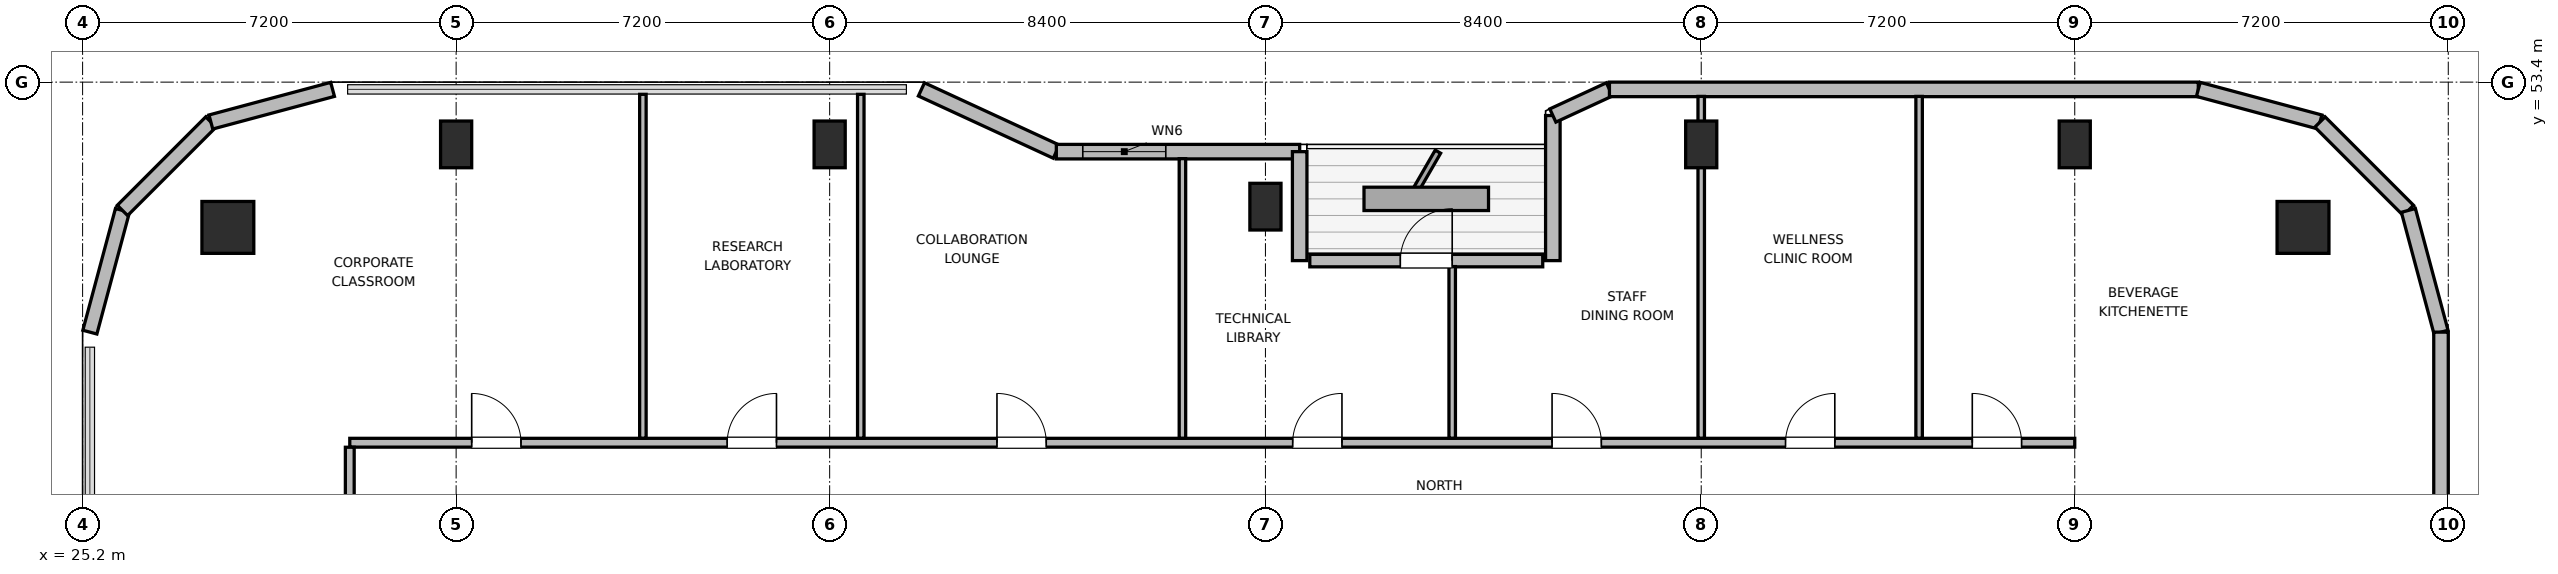
"""IFC4 building model, lengths in metres.
Left out: names, types, materials, properties, quantities, classifications, styles, units other than length and angle.
Written with IfcOpenShell. Run it as: python <this file> out.ifc"""

import sys

from ifc_helpers import new_model, si_unit, direction, frame, frame_2d, origin, origin_2d, place, context, subcontext, project, spatial, rectangle, circle, extrude, element, fill, save


model = new_model("IFC4")
c1 = context("Model", 3, precision=1e-05, world=origin(), true_north=direction((0.0, 1.0)))
c2 = subcontext(c1, "Body", "Model", "MODEL_VIEW")
j1 = project(units=[si_unit("LENGTHUNIT", "METRE"), si_unit("PLANEANGLEUNIT", "RADIAN")], contexts=[c1])
p1 = place(None, origin())
s1 = spatial("IfcSite", under=j1, at=p1, CompositionType="ELEMENT")
p2 = place(p1, origin())
s2 = spatial("IfcBuilding", under=s1, at=p2, CompositionType="ELEMENT")
p3 = place(p2, frame((0.0, 0.0, 270.6)))
s3 = spatial("IfcBuildingStorey", under=s2, at=p3, CompositionType="ELEMENT", Elevation=270.6)
for number, where, z_axis, x_axis in (
    (1, (68.0, 50.6, 0.0), (0.0, 0.0, 1.0), (1.0, 0.0, 0.0)),
    (2, (28.0, 50.6, 0.0), (0.0, 0.0, 1.0), (1.0, 0.0, 0.0)),
):
    element("IfcColumn", number, at=place(p3, frame(where, z_axis=z_axis, x_axis=x_axis)), inside=s3, PredefinedType="COLUMN", context=c2, shape_type="SweptSolid", body=[
        extrude(circle(Radius=0.5, at=origin_2d()), origin(), (0.0, 0.0, 1.0), 3.9),
    ])
for number, where, z_axis, x_axis in (
    (3, (32.4, 52.2, 0.0), (0.0, 0.0, 1.0), (1.0, 0.0, 0.0)),
    (4, (39.6, 52.2, 0.0), (0.0, 0.0, 1.0), (1.0, 0.0, 0.0)),
    (5, (48.0, 51.0, 0.0), (0.0, 0.0, 1.0), (1.0, 0.0, 0.0)),
    (6, (56.4, 52.2, 0.0), (0.0, 0.0, 1.0), (1.0, 0.0, 0.0)),
    (7, (63.6, 52.2, 0.0), (0.0, 0.0, 1.0), (1.0, 0.0, 0.0)),
):
    element("IfcColumn", number, at=place(p3, frame(where, z_axis=z_axis, x_axis=x_axis)), inside=s3, PredefinedType="COLUMN", context=c2, shape_type="SweptSolid", body=[
        extrude(rectangle(XDim=0.6, YDim=0.9, at=origin_2d()), origin(), (0.0, 0.0, 1.0), 3.9),
    ])
p4 = place(p3, frame((25.34, 48.582, 0.0), z_axis=(0.0, 0.0, 1.0), x_axis=(0.258751159445, 0.965944013639, 0.0)))
e8 = element("IfcWall", 8, at=p4, inside=s3, PredefinedType="SOLIDWALL", context=c2, shape_type="SweptSolid", body=[
    extrude(rectangle(XDim=2.429, YDim=0.28, at=frame_2d((1.214, 0.0))), origin(), (0.0, 0.0, 1.0), 3.68),
])
p5 = place(p3, frame((25.969, 50.927, 0.0), z_axis=(0.0, 0.0, 1.0), x_axis=(0.707106781187, 0.707106781187, 0.0)))
e9 = element("IfcWall", 9, at=p5, inside=s3, PredefinedType="SOLIDWALL", context=c2, shape_type="SweptSolid", body=[
    extrude(rectangle(XDim=2.41, YDim=0.28, at=frame_2d((1.205, 0.0))), origin(), (0.0, 0.0, 1.0), 3.68),
])
p6 = place(p3, frame((27.673, 52.632, 0.0), z_axis=(0.0, 0.0, 1.0), x_axis=(0.965937282298, 0.25877628691, 0.0)))
e10 = element("IfcWall", 10, at=p6, inside=s3, PredefinedType="SOLIDWALL", context=c2, shape_type="SweptSolid", body=[
    extrude(rectangle(XDim=2.428, YDim=0.28, at=frame_2d((1.214, 0.0))), origin(), (0.0, 0.0, 1.0), 3.68),
])
p7 = place(p3, frame((41.369, 53.26, 0.0), z_axis=(0.0, 0.0, 1.0), x_axis=(0.907956889006, -0.419063584324, 0.0)))
e11 = element("IfcWall", 11, at=p7, inside=s3, PredefinedType="SOLIDWALL", context=c2, shape_type="SweptSolid", body=[
    extrude(rectangle(XDim=2.864, YDim=0.28, at=frame_2d((1.432, 0.0))), origin(), (0.0, 0.0, 1.0), 2.265),
])
p8 = place(p3, frame((43.969, 52.06, 0.0), z_axis=(0.0, 0.0, 1.0), x_axis=(1.0, 0.0, 0.0)))
e12 = element("IfcWall", 12, at=p8, inside=s3, PredefinedType="SOLIDWALL", context=c2, shape_type="SweptSolid", body=[
    extrude(rectangle(XDim=4.691, YDim=0.28, at=frame_2d((2.345, 0.0))), origin(), (0.0, 0.0, 1.0), 2.265),
])
p9 = place(p8, frame((0.51, 0.0, 0.85)))
e13 = element("IfcOpeningElement", 13, at=p9, cuts=e12, PredefinedType="OPENING", context=c2, shape_type="SweptSolid", body=[
    extrude(rectangle(XDim=1.6, YDim=1.0, at=frame_2d((0.8, 0.5))), frame((0.0, 0.15, 0.0), z_axis=(0.0, -1.0, 0.0), x_axis=(1.0, 0.0, 0.0)), (0.0, 0.0, 1.0), 0.3),
])
p10 = place(p3, frame((48.66, 52.06, 0.0), z_axis=(0.0, 0.0, 1.0), x_axis=(0.0, -1.0, 0.0)))
e14 = element("IfcWall", 14, at=p10, inside=s3, PredefinedType="SOLIDWALL", context=c2, shape_type="SweptSolid", body=[
    extrude(rectangle(XDim=2.1, YDim=0.28, at=frame_2d((1.05, 0.0))), origin(), (0.0, 0.0, 1.0), 2.265),
])
p11 = place(p3, frame((48.855, 49.96, 0.0), z_axis=(0.0, 0.0, 1.0), x_axis=(1.0, 0.0, 0.0)))
e15 = element("IfcWall", 15, at=p11, inside=s3, PredefinedType="SOLIDWALL", context=c2, shape_type="SweptSolid", body=[
    extrude(rectangle(XDim=4.49, YDim=0.24, at=frame_2d((2.245, 0.0))), origin(), (0.0, 0.0, 1.0), 3.68),
])
p12 = place(p11, frame((1.745, 0.0, 0.0)))
e16 = element("IfcOpeningElement", 16, at=p12, cuts=e15, PredefinedType="OPENING", context=c2, shape_type="SweptSolid", body=[
    extrude(rectangle(XDim=1.0, YDim=2.02, at=frame_2d((0.5, 1.01))), frame((0.0, 0.13, 0.0), z_axis=(0.0, -1.0, 0.0), x_axis=(1.0, 0.0, 0.0)), (0.0, 0.0, 1.0), 0.26),
])
p13 = place(p3, frame((53.54, 49.96, 0.0), z_axis=(0.0, 0.0, 1.0), x_axis=(0.0, 1.0, 0.0)))
e17 = element("IfcWall", 17, at=p13, inside=s3, PredefinedType="SOLIDWALL", context=c2, shape_type="SweptSolid", body=[
    extrude(rectangle(XDim=2.796, YDim=0.28, at=frame_2d((1.398, 0.0))), origin(), (0.0, 0.0, 1.0), 2.265),
])
p14 = place(p3, frame((53.54, 52.756, 0.0), z_axis=(0.0, 0.0, 1.0), x_axis=(0.907893953211, 0.419199916176, 0.0)))
e18 = element("IfcWall", 18, at=p14, inside=s3, PredefinedType="SOLIDWALL", context=c2, shape_type="SweptSolid", body=[
    extrude(rectangle(XDim=1.201, YDim=0.28, at=frame_2d((0.601, 0.0))), origin(), (0.0, 0.0, 1.0), 3.68),
])
p15 = place(p3, frame((54.631, 53.26, 0.0), z_axis=(0.0, 0.0, 1.0), x_axis=(1.0, 0.0, 0.0)))
e19 = element("IfcWall", 19, at=p15, inside=s3, PredefinedType="SOLIDWALL", context=c2, shape_type="SweptSolid", body=[
    extrude(rectangle(XDim=11.351, YDim=0.28, at=frame_2d((5.675, 0.0))), origin(), (0.0, 0.0, 1.0), 3.68),
])
p16 = place(p3, frame((65.982, 53.26, 0.0), z_axis=(0.0, 0.0, 1.0), x_axis=(0.965937282298, -0.25877628691, 0.0)))
e20 = element("IfcWall", 20, at=p16, inside=s3, PredefinedType="SOLIDWALL", context=c2, shape_type="SweptSolid", body=[
    extrude(rectangle(XDim=2.428, YDim=0.28, at=frame_2d((1.214, 0.0))), origin(), (0.0, 0.0, 1.0), 3.68),
])
p17 = place(p3, frame((68.327, 52.632, 0.0), z_axis=(0.0, 0.0, 1.0), x_axis=(0.707106781187, -0.707106781187, 0.0)))
e21 = element("IfcWall", 21, at=p17, inside=s3, PredefinedType="SOLIDWALL", context=c2, shape_type="SweptSolid", body=[
    extrude(rectangle(XDim=2.41, YDim=0.28, at=frame_2d((1.205, 0.0))), origin(), (0.0, 0.0, 1.0), 3.68),
])
p18 = place(p3, frame((70.031, 50.927, 0.0), z_axis=(0.0, 0.0, 1.0), x_axis=(0.258751159445, -0.965944013639, 0.0)))
e22 = element("IfcWall", 22, at=p18, inside=s3, PredefinedType="SOLIDWALL", context=c2, shape_type="SweptSolid", body=[
    extrude(rectangle(XDim=2.429, YDim=0.28, at=frame_2d((1.214, 0.0))), origin(), (0.0, 0.0, 1.0), 3.68),
])
p19 = place(p3, frame((70.66, 48.582, 0.0), z_axis=(0.0, 0.0, 1.0), x_axis=(0.0, -1.0, 0.0)))
e23 = element("IfcWall", 23, at=p19, inside=s3, PredefinedType="SOLIDWALL", context=c2, shape_type="SweptSolid", body=[
    extrude(rectangle(XDim=5.842, YDim=0.28, at=frame_2d((2.921, 0.0))), origin(), (0.0, 0.0, 1.0), 3.68),
])
p20 = place(p3, frame((30.35, 46.45, 0.0), z_axis=(0.0, 0.0, 1.0), x_axis=(1.0, 0.0, 0.0)))
e24 = element("IfcWall", 24, at=p20, inside=s3, PredefinedType="PARTITIONING", context=c2, shape_type="SweptSolid", body=[
    extrude(rectangle(XDim=33.25, YDim=0.17, at=frame_2d((16.625, 0.0))), origin(), (0.0, 0.0, 1.0), 3.68),
])
p21 = place(p20, frame((2.35, 0.0, 0.0)))
e25 = element("IfcOpeningElement", 25, at=p21, cuts=e24, PredefinedType="OPENING", context=c2, shape_type="SweptSolid", body=[
    extrude(rectangle(XDim=0.95, YDim=2.04, at=frame_2d((0.475, 1.02))), frame((0.0, 0.095, 0.0), z_axis=(0.0, -1.0, 0.0), x_axis=(1.0, 0.0, 0.0)), (0.0, 0.0, 1.0), 0.19),
])
p22 = place(p20, frame((7.275, 0.0, 0.0)))
e26 = element("IfcOpeningElement", 26, at=p22, cuts=e24, PredefinedType="OPENING", context=c2, shape_type="SweptSolid", body=[
    extrude(rectangle(XDim=0.95, YDim=2.04, at=frame_2d((0.475, 1.02))), frame((0.0, 0.095, 0.0), z_axis=(0.0, -1.0, 0.0), x_axis=(1.0, 0.0, 0.0)), (0.0, 0.0, 1.0), 0.19),
])
p23 = place(p20, frame((12.475, 0.0, 0.0)))
e27 = element("IfcOpeningElement", 27, at=p23, cuts=e24, PredefinedType="OPENING", context=c2, shape_type="SweptSolid", body=[
    extrude(rectangle(XDim=0.95, YDim=2.04, at=frame_2d((0.475, 1.02))), frame((0.0, 0.095, 0.0), z_axis=(0.0, -1.0, 0.0), x_axis=(1.0, 0.0, 0.0)), (0.0, 0.0, 1.0), 0.19),
])
p24 = place(p20, frame((18.175, 0.0, 0.0)))
e28 = element("IfcOpeningElement", 28, at=p24, cuts=e24, PredefinedType="OPENING", context=c2, shape_type="SweptSolid", body=[
    extrude(rectangle(XDim=0.95, YDim=2.04, at=frame_2d((0.475, 1.02))), frame((0.0, 0.095, 0.0), z_axis=(0.0, -1.0, 0.0), x_axis=(1.0, 0.0, 0.0)), (0.0, 0.0, 1.0), 0.19),
])
p25 = place(p20, frame((23.175, 0.0, 0.0)))
e29 = element("IfcOpeningElement", 29, at=p25, cuts=e24, PredefinedType="OPENING", context=c2, shape_type="SweptSolid", body=[
    extrude(rectangle(XDim=0.95, YDim=2.04, at=frame_2d((0.475, 1.02))), frame((0.0, 0.095, 0.0), z_axis=(0.0, -1.0, 0.0), x_axis=(1.0, 0.0, 0.0)), (0.0, 0.0, 1.0), 0.19),
])
p26 = place(p20, frame((27.675, 0.0, 0.0)))
e30 = element("IfcOpeningElement", 30, at=p26, cuts=e24, PredefinedType="OPENING", context=c2, shape_type="SweptSolid", body=[
    extrude(rectangle(XDim=0.95, YDim=2.04, at=frame_2d((0.475, 1.02))), frame((0.0, 0.095, 0.0), z_axis=(0.0, -1.0, 0.0), x_axis=(1.0, 0.0, 0.0)), (0.0, 0.0, 1.0), 0.19),
])
p27 = place(p20, frame((31.275, 0.0, 0.0)))
e31 = element("IfcOpeningElement", 31, at=p27, cuts=e24, PredefinedType="OPENING", context=c2, shape_type="SweptSolid", body=[
    extrude(rectangle(XDim=0.95, YDim=2.04, at=frame_2d((0.475, 1.02))), frame((0.0, 0.095, 0.0), z_axis=(0.0, -1.0, 0.0), x_axis=(1.0, 0.0, 0.0)), (0.0, 0.0, 1.0), 0.19),
])
p28 = place(p3, frame((30.35, 25.637, 0.0), z_axis=(0.0, 0.0, 1.0), x_axis=(0.0, 1.0, 0.0)))
e32 = element("IfcWall", 32, at=p28, inside=s3, PredefinedType="PARTITIONING", context=c2, shape_type="SweptSolid", body=[
    extrude(rectangle(XDim=20.726, YDim=0.17, at=frame_2d((10.363, 0.0))), origin(), (0.0, 0.0, 1.0), 3.68),
])
p29 = place(p28, frame((9.888, 0.0, 0.0)))
e33 = element("IfcOpeningElement", 33, at=p29, cuts=e32, PredefinedType="OPENING", context=c2, shape_type="SweptSolid", body=[
    extrude(rectangle(XDim=0.95, YDim=2.04, at=frame_2d((0.475, 1.02))), frame((0.0, 0.095, 0.0), z_axis=(0.0, -1.0, 0.0), x_axis=(1.0, 0.0, 0.0)), (0.0, 0.0, 1.0), 0.19),
])
p30 = place(p3, frame((36.0, 46.537, 0.0), z_axis=(0.0, 0.0, 1.0), x_axis=(0.0, 1.0, 0.0)))
e34 = element("IfcWall", 34, at=p30, inside=s3, PredefinedType="PARTITIONING", context=c2, shape_type="SweptSolid", body=[
    extrude(rectangle(XDim=6.628, YDim=0.125, at=frame_2d((3.314, 0.0))), origin(), (0.0, 0.0, 1.0), 3.68),
])
p31 = place(p3, frame((40.2, 46.537, 0.0), z_axis=(0.0, 0.0, 1.0), x_axis=(0.0, 1.0, 0.0)))
e35 = element("IfcWall", 35, at=p31, inside=s3, PredefinedType="PARTITIONING", context=c2, shape_type="SweptSolid", body=[
    extrude(rectangle(XDim=6.628, YDim=0.125, at=frame_2d((3.314, 0.0))), origin(), (0.0, 0.0, 1.0), 3.043),
])
p32 = place(p3, frame((46.4, 46.537, 0.0), z_axis=(0.0, 0.0, 1.0), x_axis=(0.0, 1.0, 0.0)))
e36 = element("IfcWall", 36, at=p32, inside=s3, PredefinedType="PARTITIONING", context=c2, shape_type="SweptSolid", body=[
    extrude(rectangle(XDim=5.388, YDim=0.125, at=frame_2d((2.694, 0.0))), origin(), (0.0, 0.0, 1.0), 3.68),
])
p33 = place(p3, frame((51.6, 46.537, 0.0), z_axis=(0.0, 0.0, 1.0), x_axis=(0.0, 1.0, 0.0)))
e37 = element("IfcWall", 37, at=p33, inside=s3, PredefinedType="PARTITIONING", context=c2, shape_type="SweptSolid", body=[
    extrude(rectangle(XDim=3.308, YDim=0.125, at=frame_2d((1.654, 0.0))), origin(), (0.0, 0.0, 1.0), 3.68),
])
p34 = place(p3, frame((56.4, 46.537, 0.0), z_axis=(0.0, 0.0, 1.0), x_axis=(0.0, 1.0, 0.0)))
e38 = element("IfcWall", 38, at=p34, inside=s3, PredefinedType="PARTITIONING", context=c2, shape_type="SweptSolid", body=[
    extrude(rectangle(XDim=6.588, YDim=0.125, at=frame_2d((3.294, 0.0))), origin(), (0.0, 0.0, 1.0), 3.043),
])
p35 = place(p3, frame((60.6, 46.537, 0.0), z_axis=(0.0, 0.0, 1.0), x_axis=(0.0, 1.0, 0.0)))
e39 = element("IfcWall", 39, at=p35, inside=s3, PredefinedType="PARTITIONING", context=c2, shape_type="SweptSolid", body=[
    extrude(rectangle(XDim=6.588, YDim=0.125, at=frame_2d((3.294, 0.0))), origin(), (0.0, 0.0, 1.0), 3.68),
])
p36 = place(p9, origin())
e40 = element("IfcWindow", 40, at=p36, inside=s3, PartitioningType="SINGLE_PANEL", PredefinedType="WINDOW", context=c2, shape_type="SweptSolid", body=[
    extrude(rectangle(XDim=1.6, YDim=1.0, at=frame_2d((0.8, 0.5))), frame((0.0, 0.03, 0.0), z_axis=(0.0, -1.0, 0.0), x_axis=(1.0, 0.0, 0.0)), (0.0, 0.0, 1.0), 0.06),
])
fill(e13, e40)
p37 = place(p12, origin())
e41 = element("IfcDoor", 41, at=p37, inside=s3, OperationType="SINGLE_SWING_RIGHT", PredefinedType="DOOR", context=c2, shape_type="SweptSolid", body=[
    extrude(rectangle(XDim=1.0, YDim=2.02, at=frame_2d((0.5, 1.01))), frame((0.0, 0.025, 0.0), z_axis=(0.0, -1.0, 0.0), x_axis=(1.0, 0.0, 0.0)), (0.0, 0.0, 1.0), 0.05),
])
fill(e16, e41)
p38 = place(p21, origin())
e42 = element("IfcDoor", 42, at=p38, inside=s3, OperationType="SINGLE_SWING_LEFT", PredefinedType="DOOR", context=c2, shape_type="SweptSolid", body=[
    extrude(rectangle(XDim=0.95, YDim=2.04, at=frame_2d((0.475, 1.02))), frame((0.0, 0.025, 0.0), z_axis=(0.0, -1.0, 0.0), x_axis=(1.0, 0.0, 0.0)), (0.0, 0.0, 1.0), 0.05),
])
fill(e25, e42)
p39 = place(p22, origin())
e43 = element("IfcDoor", 43, at=p39, inside=s3, OperationType="SINGLE_SWING_RIGHT", PredefinedType="DOOR", context=c2, shape_type="SweptSolid", body=[
    extrude(rectangle(XDim=0.95, YDim=2.04, at=frame_2d((0.475, 1.02))), frame((0.0, 0.025, 0.0), z_axis=(0.0, -1.0, 0.0), x_axis=(1.0, 0.0, 0.0)), (0.0, 0.0, 1.0), 0.05),
])
fill(e26, e43)
p40 = place(p23, origin())
e44 = element("IfcDoor", 44, at=p40, inside=s3, OperationType="SINGLE_SWING_LEFT", PredefinedType="DOOR", context=c2, shape_type="SweptSolid", body=[
    extrude(rectangle(XDim=0.95, YDim=2.04, at=frame_2d((0.475, 1.02))), frame((0.0, 0.025, 0.0), z_axis=(0.0, -1.0, 0.0), x_axis=(1.0, 0.0, 0.0)), (0.0, 0.0, 1.0), 0.05),
])
fill(e27, e44)
p41 = place(p24, origin())
e45 = element("IfcDoor", 45, at=p41, inside=s3, OperationType="SINGLE_SWING_RIGHT", PredefinedType="DOOR", context=c2, shape_type="SweptSolid", body=[
    extrude(rectangle(XDim=0.95, YDim=2.04, at=frame_2d((0.475, 1.02))), frame((0.0, 0.025, 0.0), z_axis=(0.0, -1.0, 0.0), x_axis=(1.0, 0.0, 0.0)), (0.0, 0.0, 1.0), 0.05),
])
fill(e28, e45)
p42 = place(p25, origin())
e46 = element("IfcDoor", 46, at=p42, inside=s3, OperationType="SINGLE_SWING_LEFT", PredefinedType="DOOR", context=c2, shape_type="SweptSolid", body=[
    extrude(rectangle(XDim=0.95, YDim=2.04, at=frame_2d((0.475, 1.02))), frame((0.0, 0.025, 0.0), z_axis=(0.0, -1.0, 0.0), x_axis=(1.0, 0.0, 0.0)), (0.0, 0.0, 1.0), 0.05),
])
fill(e29, e46)
p43 = place(p26, origin())
e47 = element("IfcDoor", 47, at=p43, inside=s3, OperationType="SINGLE_SWING_RIGHT", PredefinedType="DOOR", context=c2, shape_type="SweptSolid", body=[
    extrude(rectangle(XDim=0.95, YDim=2.04, at=frame_2d((0.475, 1.02))), frame((0.0, 0.025, 0.0), z_axis=(0.0, -1.0, 0.0), x_axis=(1.0, 0.0, 0.0)), (0.0, 0.0, 1.0), 0.05),
])
fill(e30, e47)
p44 = place(p27, origin())
e48 = element("IfcDoor", 48, at=p44, inside=s3, OperationType="SINGLE_SWING_LEFT", PredefinedType="DOOR", context=c2, shape_type="SweptSolid", body=[
    extrude(rectangle(XDim=0.95, YDim=2.04, at=frame_2d((0.475, 1.02))), frame((0.0, 0.025, 0.0), z_axis=(0.0, -1.0, 0.0), x_axis=(1.0, 0.0, 0.0)), (0.0, 0.0, 1.0), 0.05),
])
fill(e31, e48)
save(model, sys.argv[1])
